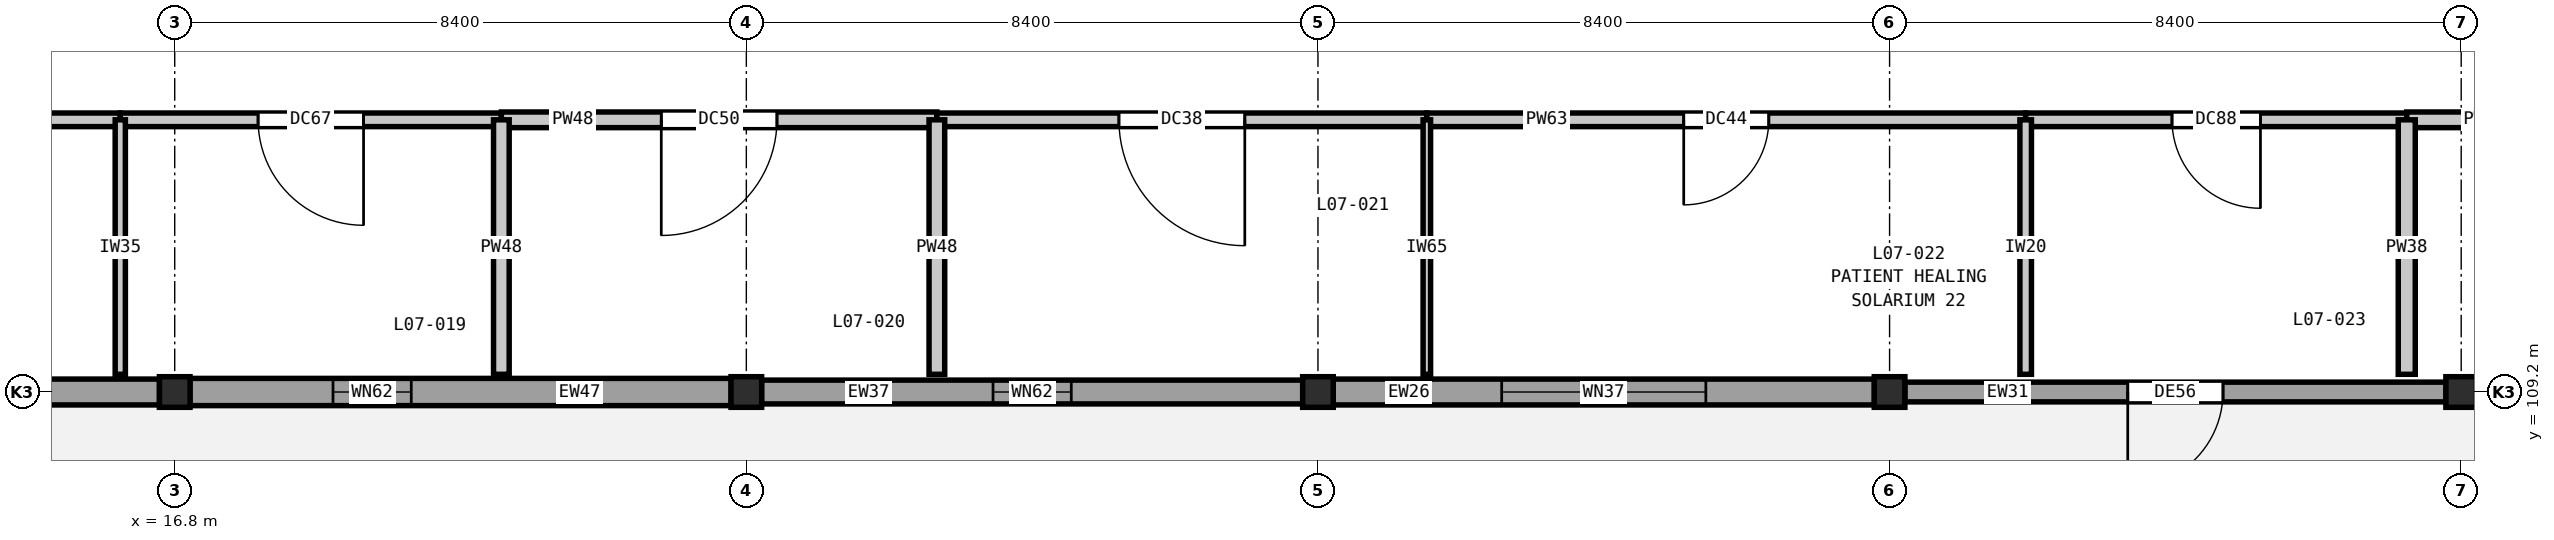
"""IFC4 building model, lengths in metres.
Left out: names, types, materials, properties, quantities, classifications, styles, units other than length and angle.
Written with IfcOpenShell. Run it as: python <this file> out.ifc"""

import sys

from ifc_helpers import new_model, si_unit, direction, frame, frame_2d, origin, origin_2d, place, context, subcontext, project, spatial, rectangle, extrude, element, fill, save


model = new_model("IFC4")
c1 = context("Model", 3, precision=1e-05, world=origin(), true_north=direction((0.0, 1.0)))
c2 = subcontext(c1, "Body", "Model", "MODEL_VIEW")
j1 = project(units=[si_unit("LENGTHUNIT", "METRE"), si_unit("PLANEANGLEUNIT", "RADIAN")], contexts=[c1])
p1 = place(None, origin())
s1 = spatial("IfcSite", under=j1, at=p1, CompositionType="ELEMENT")
p2 = place(p1, origin())
s2 = spatial("IfcBuilding", under=s1, at=p2, CompositionType="ELEMENT")
p3 = place(p2, frame((0.0, 0.0, 33.0)))
s3 = spatial("IfcBuildingStorey", under=s2, at=p3, CompositionType="ELEMENT", Elevation=33.0)
for number, where, z_axis, x_axis in (
    (1, (16.8, 109.2, 0.0), (0.0, 0.0, 1.0), (1.0, 0.0, 0.0)),
    (2, (25.2, 109.2, 0.0), (0.0, 0.0, 1.0), (1.0, 0.0, 0.0)),
    (3, (33.6, 109.2, 0.0), (0.0, 0.0, 1.0), (1.0, 0.0, 0.0)),
    (4, (42.0, 109.2, 0.0), (0.0, 0.0, 1.0), (1.0, 0.0, 0.0)),
    (5, (50.4, 109.2, 0.0), (0.0, 0.0, 1.0), (1.0, 0.0, 0.0)),
):
    element("IfcColumn", number, at=place(p3, frame(where, z_axis=z_axis, x_axis=x_axis)), inside=s3, PredefinedType="COLUMN", context=c2, shape_type="SweptSolid", body=[
        extrude(rectangle(XDim=0.45, YDim=0.45, at=origin_2d()), origin(), (0.0, 0.0, 1.0), 4.2),
    ])
p4 = place(p3, frame((50.177, 109.2, 0.0), z_axis=(0.0, 0.0, 1.0), x_axis=(-1.0, 0.0, 0.0)))
e6 = element("IfcWall", 6, at=p4, inside=s3, PredefinedType="SOLIDWALL", context=c2, shape_type="SweptSolid", body=[
    extrude(rectangle(XDim=7.954, YDim=0.29, at=frame_2d((3.977, 0.0))), origin(), (0.0, 0.0, 1.0), 3.48),
])
p5 = place(p4, frame((3.277, 0.0, 0.0)))
e7 = element("IfcOpeningElement", 7, at=p5, cuts=e6, PredefinedType="OPENING", context=c2, shape_type="SweptSolid", body=[
    extrude(rectangle(XDim=1.4, YDim=2.2, at=frame_2d((0.7, 1.1))), frame((0.0, 0.155, 0.0), z_axis=(0.0, -1.0, 0.0), x_axis=(1.0, 0.0, 0.0)), (0.0, 0.0, 1.0), 0.31),
])
p6 = place(p3, frame((41.777, 109.2, 0.0), z_axis=(0.0, 0.0, 1.0), x_axis=(-1.0, 0.0, 0.0)))
e8 = element("IfcWall", 8, at=p6, inside=s3, PredefinedType="SOLIDWALL", context=c2, shape_type="SweptSolid", body=[
    extrude(rectangle(XDim=7.954, YDim=0.38, at=frame_2d((3.977, 0.0))), origin(), (0.0, 0.0, 1.0), 3.48),
])
p7 = place(p6, frame((2.477, 0.0, 0.9)))
e9 = element("IfcOpeningElement", 9, at=p7, cuts=e8, PredefinedType="OPENING", context=c2, shape_type="SweptSolid", body=[
    extrude(rectangle(XDim=3.0, YDim=2.15, at=frame_2d((1.5, 1.075))), frame((0.0, 0.2, 0.0), z_axis=(0.0, -1.0, 0.0), x_axis=(1.0, 0.0, 0.0)), (0.0, 0.0, 1.0), 0.4),
])
p8 = place(p3, frame((33.377, 109.2, 0.0), z_axis=(0.0, 0.0, 1.0), x_axis=(-1.0, 0.0, 0.0)))
e10 = element("IfcWall", 10, at=p8, inside=s3, PredefinedType="SOLIDWALL", context=c2, shape_type="SweptSolid", body=[
    extrude(rectangle(XDim=7.954, YDim=0.35, at=frame_2d((3.977, 0.0))), origin(), (0.0, 0.0, 1.0), 3.48),
])
p9 = place(p8, frame((3.402, 0.0, 0.9)))
e11 = element("IfcOpeningElement", 11, at=p9, cuts=e10, PredefinedType="OPENING", context=c2, shape_type="SweptSolid", body=[
    extrude(rectangle(XDim=1.15, YDim=1.4, at=frame_2d((0.575, 0.7))), frame((0.0, 0.185, 0.0), z_axis=(0.0, -1.0, 0.0), x_axis=(1.0, 0.0, 0.0)), (0.0, 0.0, 1.0), 0.37),
])
p10 = place(p3, frame((24.977, 109.2, 0.0), z_axis=(0.0, 0.0, 1.0), x_axis=(-1.0, 0.0, 0.0)))
e12 = element("IfcWall", 12, at=p10, inside=s3, PredefinedType="SOLIDWALL", context=c2, shape_type="SweptSolid", body=[
    extrude(rectangle(XDim=7.954, YDim=0.4, at=frame_2d((3.977, 0.0))), origin(), (0.0, 0.0, 1.0), 3.48),
])
p11 = place(p10, frame((4.701, 0.0, 0.9)))
e13 = element("IfcOpeningElement", 13, at=p11, cuts=e12, PredefinedType="OPENING", context=c2, shape_type="SweptSolid", body=[
    extrude(rectangle(XDim=1.15, YDim=1.4, at=frame_2d((0.575, 0.7))), frame((0.0, 0.21, 0.0), z_axis=(0.0, -1.0, 0.0), x_axis=(1.0, 0.0, 0.0)), (0.0, 0.0, 1.0), 0.42),
])
p12 = place(p3, frame((16.577, 109.2, 0.0), z_axis=(0.0, 0.0, 1.0), x_axis=(-1.0, 0.0, 0.0)))
e14 = element("IfcWall", 14, at=p12, inside=s3, PredefinedType="SOLIDWALL", context=c2, shape_type="SweptSolid", body=[
    extrude(rectangle(XDim=7.954, YDim=0.38, at=frame_2d((3.977, 0.0))), origin(), (0.0, 0.0, 1.0), 3.48),
])
p13 = place(p12, frame((3.402, 0.0, 0.9)))
e15 = element("IfcOpeningElement", 15, at=p13, cuts=e14, PredefinedType="OPENING", context=c2, shape_type="SweptSolid", body=[
    extrude(rectangle(XDim=1.15, YDim=1.4, at=frame_2d((0.575, 0.7))), frame((0.0, 0.2, 0.0), z_axis=(0.0, -1.0, 0.0), x_axis=(1.0, 0.0, 0.0)), (0.0, 0.0, 1.0), 0.4),
])
p14 = place(p3, frame((7.2, 113.2, 0.0), z_axis=(0.0, 0.0, 1.0), x_axis=(1.0, 0.0, 0.0)))
e16 = element("IfcWall", 16, at=p14, inside=s3, PredefinedType="PARTITIONING", context=c2, shape_type="SweptSolid", body=[
    extrude(rectangle(XDim=8.8, YDim=0.2, at=frame_2d((4.4, 0.0))), origin(), (0.0, 0.0, 1.0), 3.92),
])
p15 = place(p14, frame((3.675, 0.0, 0.0)))
e17 = element("IfcOpeningElement", 17, at=p15, cuts=e16, PredefinedType="OPENING", context=c2, shape_type="SweptSolid", body=[
    extrude(rectangle(XDim=1.45, YDim=2.25, at=frame_2d((0.725, 1.125))), frame((0.0, 0.11, 0.0), z_axis=(0.0, -1.0, 0.0), x_axis=(1.0, 0.0, 0.0)), (0.0, 0.0, 1.0), 0.22),
])
p16 = place(p3, frame((16.0, 113.2, 0.0), z_axis=(0.0, 0.0, 1.0), x_axis=(1.0, 0.0, 0.0)))
e18 = element("IfcWall", 18, at=p16, inside=s3, PredefinedType="PARTITIONING", context=c2, shape_type="SweptSolid", body=[
    extrude(rectangle(XDim=5.6, YDim=0.2, at=frame_2d((2.8, 0.0))), origin(), (0.0, 0.0, 1.0), 3.92),
])
p17 = place(p16, frame((2.025, 0.0, 0.0)))
e19 = element("IfcOpeningElement", 19, at=p17, cuts=e18, PredefinedType="OPENING", context=c2, shape_type="SweptSolid", body=[
    extrude(rectangle(XDim=1.55, YDim=2.25, at=frame_2d((0.775, 1.125))), frame((0.0, 0.11, 0.0), z_axis=(0.0, -1.0, 0.0), x_axis=(1.0, 0.0, 0.0)), (0.0, 0.0, 1.0), 0.22),
])
p18 = place(p3, frame((21.6, 113.2, 0.0), z_axis=(0.0, 0.0, 1.0), x_axis=(1.0, 0.0, 0.0)))
e20 = element("IfcWall", 20, at=p18, inside=s3, PredefinedType="PARTITIONING", context=c2, shape_type="SweptSolid", body=[
    extrude(rectangle(XDim=6.4, YDim=0.23, at=frame_2d((3.2, 0.0))), origin(), (0.0, 0.0, 1.0), 3.92),
])
p19 = place(p18, frame((2.35, 0.0, 0.0)))
e21 = element("IfcOpeningElement", 21, at=p19, cuts=e20, PredefinedType="OPENING", context=c2, shape_type="SweptSolid", body=[
    extrude(rectangle(XDim=1.7, YDim=2.3, at=frame_2d((0.85, 1.15))), frame((0.0, 0.125, 0.0), z_axis=(0.0, -1.0, 0.0), x_axis=(1.0, 0.0, 0.0)), (0.0, 0.0, 1.0), 0.25),
])
p20 = place(p3, frame((28.0, 113.2, 0.0), z_axis=(0.0, 0.0, 1.0), x_axis=(1.0, 0.0, 0.0)))
e22 = element("IfcWall", 22, at=p20, inside=s3, PredefinedType="PARTITIONING", context=c2, shape_type="SweptSolid", body=[
    extrude(rectangle(XDim=7.2, YDim=0.2, at=frame_2d((3.6, 0.0))), origin(), (0.0, 0.0, 1.0), 3.92),
])
p21 = place(p20, frame((2.675, 0.0, 0.0)))
e23 = element("IfcOpeningElement", 23, at=p21, cuts=e22, PredefinedType="OPENING", context=c2, shape_type="SweptSolid", body=[
    extrude(rectangle(XDim=1.85, YDim=2.3, at=frame_2d((0.925, 1.15))), frame((0.0, 0.11, 0.0), z_axis=(0.0, -1.0, 0.0), x_axis=(1.0, 0.0, 0.0)), (0.0, 0.0, 1.0), 0.22),
])
p22 = place(p3, frame((35.2, 113.2, 0.0), z_axis=(0.0, 0.0, 1.0), x_axis=(1.0, 0.0, 0.0)))
e24 = element("IfcWall", 24, at=p22, inside=s3, PredefinedType="PARTITIONING", context=c2, shape_type="SweptSolid", body=[
    extrude(rectangle(XDim=8.8, YDim=0.2, at=frame_2d((4.4, 0.0))), origin(), (0.0, 0.0, 1.0), 3.92),
])
p23 = place(p22, frame((3.775, 0.0, 0.0)))
e25 = element("IfcOpeningElement", 25, at=p23, cuts=e24, PredefinedType="OPENING", context=c2, shape_type="SweptSolid", body=[
    extrude(rectangle(XDim=1.25, YDim=2.15, at=frame_2d((0.625, 1.075))), frame((0.0, 0.11, 0.0), z_axis=(0.0, -1.0, 0.0), x_axis=(1.0, 0.0, 0.0)), (0.0, 0.0, 1.0), 0.22),
])
p24 = place(p3, frame((44.0, 113.2, 0.0), z_axis=(0.0, 0.0, 1.0), x_axis=(1.0, 0.0, 0.0)))
e26 = element("IfcWall", 26, at=p24, inside=s3, PredefinedType="PARTITIONING", context=c2, shape_type="SweptSolid", body=[
    extrude(rectangle(XDim=5.6, YDim=0.2, at=frame_2d((2.8, 0.0))), origin(), (0.0, 0.0, 1.0), 3.92),
])
p25 = place(p24, frame((2.15, 0.0, 0.0)))
e27 = element("IfcOpeningElement", 27, at=p25, cuts=e26, PredefinedType="OPENING", context=c2, shape_type="SweptSolid", body=[
    extrude(rectangle(XDim=1.3, YDim=2.2, at=frame_2d((0.65, 1.1))), frame((0.0, 0.11, 0.0), z_axis=(0.0, -1.0, 0.0), x_axis=(1.0, 0.0, 0.0)), (0.0, 0.0, 1.0), 0.22),
])
p26 = place(p3, frame((49.6, 113.2, 0.0), z_axis=(0.0, 0.0, 1.0), x_axis=(1.0, 0.0, 0.0)))
e28 = element("IfcWall", 28, at=p26, inside=s3, PredefinedType="PARTITIONING", context=c2, shape_type="SweptSolid", body=[
    extrude(rectangle(XDim=6.4, YDim=0.23, at=frame_2d((3.2, 0.0))), origin(), (0.0, 0.0, 1.0), 3.92),
])
p27 = place(p26, frame((2.525, 0.0, 0.0)))
e29 = element("IfcOpeningElement", 29, at=p27, cuts=e28, PredefinedType="OPENING", context=c2, shape_type="SweptSolid", body=[
    extrude(rectangle(XDim=1.35, YDim=2.2, at=frame_2d((0.675, 1.1))), frame((0.0, 0.125, 0.0), z_axis=(0.0, -1.0, 0.0), x_axis=(1.0, 0.0, 0.0)), (0.0, 0.0, 1.0), 0.25),
])
p28 = place(p3, frame((16.0, 109.46, 0.0), z_axis=(0.0, 0.0, 1.0), x_axis=(0.0, 1.0, 0.0)))
e30 = element("IfcWall", 30, at=p28, inside=s3, PredefinedType="PARTITIONING", context=c2, shape_type="SweptSolid", body=[
    extrude(rectangle(XDim=3.74, YDim=0.15, at=frame_2d((1.87, 0.0))), origin(), (0.0, 0.0, 1.0), 3.92),
])
for number, where, z_axis, x_axis in (
    (31, (21.6, 109.46, 0.0), (0.0, 0.0, 1.0), (0.0, 1.0, 0.0)),
    (32, (28.0, 109.46, 0.0), (0.0, 0.0, 1.0), (0.0, 1.0, 0.0)),
):
    element("IfcWall", number, at=place(p3, frame(where, z_axis=z_axis, x_axis=x_axis)), inside=s3, PredefinedType="PARTITIONING", context=c2, shape_type="SweptSolid", body=[
        extrude(rectangle(XDim=3.74, YDim=0.23, at=frame_2d((1.87, 0.0))), origin(), (0.0, 0.0, 1.0), 3.92),
    ])
p29 = place(p3, frame((35.2, 109.46, 0.0), z_axis=(0.0, 0.0, 1.0), x_axis=(0.0, 1.0, 0.0)))
e33 = element("IfcWall", 33, at=p29, inside=s3, PredefinedType="PARTITIONING", context=c2, shape_type="SweptSolid", body=[
    extrude(rectangle(XDim=3.74, YDim=0.11, at=frame_2d((1.87, 0.0))), origin(), (0.0, 0.0, 1.0), 3.92),
])
p30 = place(p3, frame((44.0, 109.46, 0.0), z_axis=(0.0, 0.0, 1.0), x_axis=(0.0, 1.0, 0.0)))
e34 = element("IfcWall", 34, at=p30, inside=s3, PredefinedType="PARTITIONING", context=c2, shape_type="SweptSolid", body=[
    extrude(rectangle(XDim=3.74, YDim=0.17, at=frame_2d((1.87, 0.0))), origin(), (0.0, 0.0, 1.0), 3.92),
])
p31 = place(p3, frame((49.6, 109.46, 0.0), z_axis=(0.0, 0.0, 1.0), x_axis=(0.0, 1.0, 0.0)))
e35 = element("IfcWall", 35, at=p31, inside=s3, PredefinedType="PARTITIONING", context=c2, shape_type="SweptSolid", body=[
    extrude(rectangle(XDim=3.74, YDim=0.25, at=frame_2d((1.87, 0.0))), origin(), (0.0, 0.0, 1.0), 3.92),
])
p32 = place(p5, origin())
e36 = element("IfcDoor", 36, at=p32, inside=s3, OperationType="SINGLE_SWING_RIGHT", PredefinedType="DOOR", context=c2, shape_type="SweptSolid", body=[
    extrude(rectangle(XDim=1.4, YDim=2.2, at=frame_2d((0.7, 1.1))), frame((0.0, 0.025, 0.0), z_axis=(0.0, -1.0, 0.0), x_axis=(1.0, 0.0, 0.0)), (0.0, 0.0, 1.0), 0.05),
])
fill(e7, e36)
p33 = place(p7, origin())
e37 = element("IfcWindow", 37, at=p33, inside=s3, PartitioningType="DOUBLE_PANEL_VERTICAL", PredefinedType="WINDOW", context=c2, shape_type="SweptSolid", body=[
    extrude(rectangle(XDim=3.0, YDim=2.15, at=frame_2d((1.5, 1.075))), frame((0.0, 0.03, 0.0), z_axis=(0.0, -1.0, 0.0), x_axis=(1.0, 0.0, 0.0)), (0.0, 0.0, 1.0), 0.06),
])
fill(e9, e37)
p34 = place(p9, origin())
e38 = element("IfcWindow", 38, at=p34, inside=s3, PartitioningType="SINGLE_PANEL", PredefinedType="WINDOW", context=c2, shape_type="SweptSolid", body=[
    extrude(rectangle(XDim=1.15, YDim=1.4, at=frame_2d((0.575, 0.7))), frame((0.0, 0.03, 0.0), z_axis=(0.0, -1.0, 0.0), x_axis=(1.0, 0.0, 0.0)), (0.0, 0.0, 1.0), 0.06),
])
fill(e11, e38)
p35 = place(p11, origin())
e39 = element("IfcWindow", 39, at=p35, inside=s3, PartitioningType="SINGLE_PANEL", PredefinedType="WINDOW", context=c2, shape_type="SweptSolid", body=[
    extrude(rectangle(XDim=1.15, YDim=1.4, at=frame_2d((0.575, 0.7))), frame((0.0, 0.03, 0.0), z_axis=(0.0, -1.0, 0.0), x_axis=(1.0, 0.0, 0.0)), (0.0, 0.0, 1.0), 0.06),
])
fill(e13, e39)
p36 = place(p17, frame((1.55, 0.0, 0.0), z_axis=(0.0, 0.0, 1.0), x_axis=(-1.0, 0.0, 0.0)))
e40 = element("IfcDoor", 40, at=p36, inside=s3, OperationType="SINGLE_SWING_LEFT", PredefinedType="DOOR", context=c2, shape_type="SweptSolid", body=[
    extrude(rectangle(XDim=1.55, YDim=2.25, at=frame_2d((0.775, 1.125))), frame((0.0, 0.025, 0.0), z_axis=(0.0, -1.0, 0.0), x_axis=(1.0, 0.0, 0.0)), (0.0, 0.0, 1.0), 0.05),
])
fill(e19, e40)
p37 = place(p19, frame((1.7, 0.0, 0.0), z_axis=(0.0, 0.0, 1.0), x_axis=(-1.0, 0.0, 0.0)))
e41 = element("IfcDoor", 41, at=p37, inside=s3, OperationType="SINGLE_SWING_RIGHT", PredefinedType="DOOR", context=c2, shape_type="SweptSolid", body=[
    extrude(rectangle(XDim=1.7, YDim=2.3, at=frame_2d((0.85, 1.15))), frame((0.0, 0.025, 0.0), z_axis=(0.0, -1.0, 0.0), x_axis=(1.0, 0.0, 0.0)), (0.0, 0.0, 1.0), 0.05),
])
fill(e21, e41)
p38 = place(p21, frame((1.85, 0.0, 0.0), z_axis=(0.0, 0.0, 1.0), x_axis=(-1.0, 0.0, 0.0)))
e42 = element("IfcDoor", 42, at=p38, inside=s3, OperationType="SINGLE_SWING_LEFT", PredefinedType="DOOR", context=c2, shape_type="SweptSolid", body=[
    extrude(rectangle(XDim=1.85, YDim=2.3, at=frame_2d((0.925, 1.15))), frame((0.0, 0.025, 0.0), z_axis=(0.0, -1.0, 0.0), x_axis=(1.0, 0.0, 0.0)), (0.0, 0.0, 1.0), 0.05),
])
fill(e23, e42)
p39 = place(p23, frame((1.25, 0.0, 0.0), z_axis=(0.0, 0.0, 1.0), x_axis=(-1.0, 0.0, 0.0)))
e43 = element("IfcDoor", 43, at=p39, inside=s3, OperationType="SINGLE_SWING_RIGHT", PredefinedType="DOOR", context=c2, shape_type="SweptSolid", body=[
    extrude(rectangle(XDim=1.25, YDim=2.15, at=frame_2d((0.625, 1.075))), frame((0.0, 0.025, 0.0), z_axis=(0.0, -1.0, 0.0), x_axis=(1.0, 0.0, 0.0)), (0.0, 0.0, 1.0), 0.05),
])
fill(e25, e43)
p40 = place(p25, frame((1.3, 0.0, 0.0), z_axis=(0.0, 0.0, 1.0), x_axis=(-1.0, 0.0, 0.0)))
e44 = element("IfcDoor", 44, at=p40, inside=s3, OperationType="SINGLE_SWING_LEFT", PredefinedType="DOOR", context=c2, shape_type="SweptSolid", body=[
    extrude(rectangle(XDim=1.3, YDim=2.2, at=frame_2d((0.65, 1.1))), frame((0.0, 0.025, 0.0), z_axis=(0.0, -1.0, 0.0), x_axis=(1.0, 0.0, 0.0)), (0.0, 0.0, 1.0), 0.05),
])
fill(e27, e44)
save(model, sys.argv[1])
